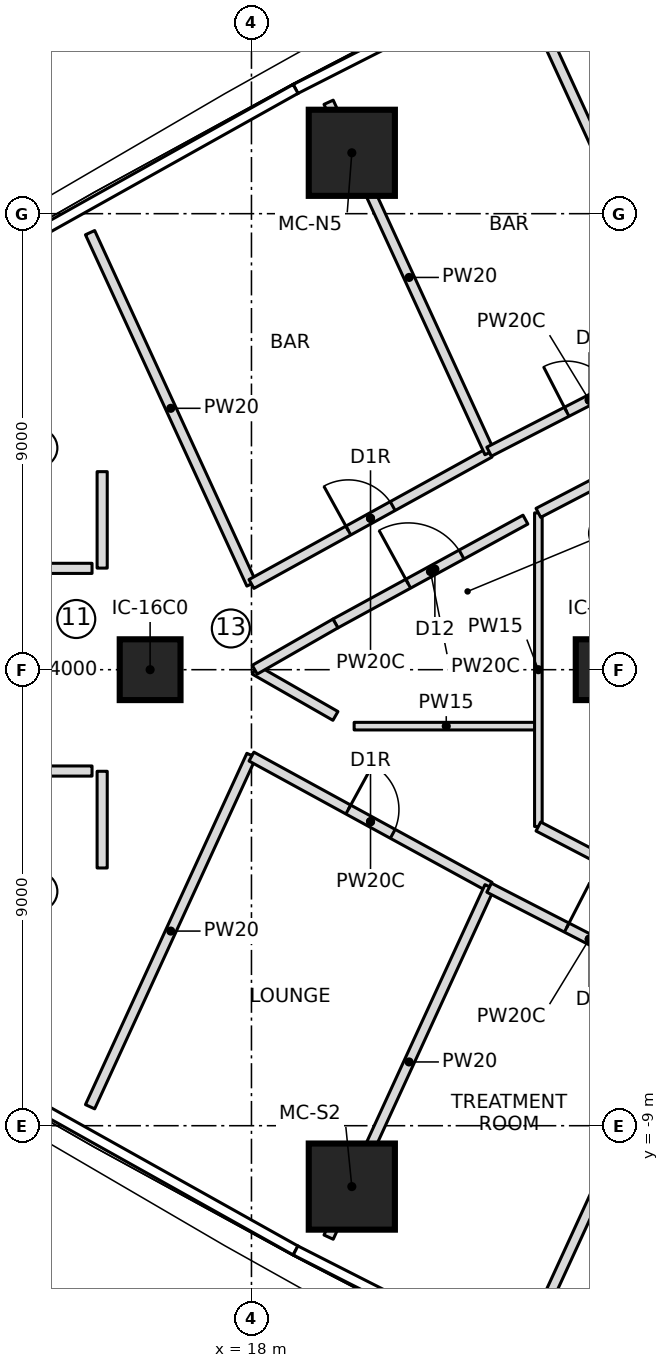
"""IFC4 building model, lengths in metres.
Left out: names, types, materials, properties, quantities, classifications, styles, units other than length and angle.
Written with IfcOpenShell. Run it as: python <this file> out.ifc"""

import sys

from ifc_helpers import new_model, si_unit, direction, frame, frame_2d, origin, origin_2d, place, context, subcontext, project, spatial, rectangle, extrude, element, fill, save


model = new_model("IFC4")
c1 = context("Model", 3, precision=1e-05, world=origin(), true_north=direction((0.0, 1.0)))
c2 = subcontext(c1, "Body", "Model", "MODEL_VIEW")
j1 = project(units=[si_unit("LENGTHUNIT", "METRE"), si_unit("PLANEANGLEUNIT", "RADIAN")], contexts=[c1])
p1 = place(None, origin())
s1 = spatial("IfcSite", under=j1, at=p1, CompositionType="ELEMENT")
p2 = place(p1, origin())
s2 = spatial("IfcBuilding", under=s1, at=p2, CompositionType="ELEMENT")
p3 = place(p2, frame((0.0, 0.0, 80.3)))
s3 = spatial("IfcBuildingStorey", under=s2, at=p3, CompositionType="ELEMENT", Elevation=80.3)
for number, where, z_axis, x_axis in (
    (1, (19.981, -10.202, 0.0), (0.0, 0.0, 1.0), (1.0, 0.0, 0.0)),
    (2, (19.981, 10.202, 0.0), (0.0, 0.0, 1.0), (1.0, 0.0, 0.0)),
):
    element("IfcColumn", number, at=place(p3, frame(where, z_axis=z_axis, x_axis=x_axis)), inside=s3, PredefinedType="COLUMN", context=c2, shape_type="SweptSolid", body=[
        extrude(rectangle(XDim=1.7, YDim=1.7, at=origin_2d()), origin(), (0.0, 0.0, 1.0), 4.6),
    ])
for number, where, z_axis, x_axis in (
    (3, (16.0, 0.0, 0.0), (0.0, 0.0, 1.0), (1.0, 0.0, 0.0)),
    (4, (25.0, 0.0, 0.0), (0.0, 0.0, 1.0), (1.0, 0.0, 0.0)),
):
    element("IfcColumn", number, at=place(p3, frame(where, z_axis=z_axis, x_axis=x_axis)), inside=s3, PredefinedType="COLUMN", context=c2, shape_type="SweptSolid", body=[
        extrude(rectangle(XDim=1.2, YDim=1.2, at=origin_2d()), origin(), (0.0, 0.0, 1.0), 4.6),
    ])
p4 = place(p3, frame((11.685, 2.0, 0.0), z_axis=(0.0, 0.0, 1.0), x_axis=(1.0, 0.0, 0.0)))
e5 = element("IfcWall", 5, at=p4, inside=s3, PredefinedType="PARTITIONING", context=c2, shape_type="SweptSolid", body=[
    extrude(rectangle(XDim=3.168, YDim=0.2, at=frame_2d((1.584, 0.0))), origin(), (0.0, 0.0, 1.0), 4.3),
])
p5 = place(p4, frame((1.084, 0.0, 0.0)))
e6 = element("IfcOpeningElement", 6, at=p5, cuts=e5, PredefinedType="OPENING", context=c2, shape_type="SweptSolid", body=[
    extrude(rectangle(XDim=1.0, YDim=2.1, at=frame_2d((0.5, 1.05))), frame((0.0, 0.11, 0.0), z_axis=(0.0, -1.0, 0.0), x_axis=(1.0, 0.0, 0.0)), (0.0, 0.0, 1.0), 0.22),
])
p6 = place(p3, frame((11.685, -2.0, 0.0), z_axis=(0.0, 0.0, 1.0), x_axis=(1.0, 0.0, 0.0)))
e7 = element("IfcWall", 7, at=p6, inside=s3, PredefinedType="PARTITIONING", context=c2, shape_type="SweptSolid", body=[
    extrude(rectangle(XDim=3.168, YDim=0.2, at=frame_2d((1.584, 0.0))), origin(), (0.0, 0.0, 1.0), 4.3),
])
p7 = place(p6, frame((1.084, 0.0, 0.0)))
e8 = element("IfcOpeningElement", 8, at=p7, cuts=e7, PredefinedType="OPENING", context=c2, shape_type="SweptSolid", body=[
    extrude(rectangle(XDim=1.0, YDim=2.1, at=frame_2d((0.5, 1.05))), frame((0.0, 0.11, 0.0), z_axis=(0.0, -1.0, 0.0), x_axis=(1.0, 0.0, 0.0)), (0.0, 0.0, 1.0), 0.22),
])
p8 = place(p3, frame((14.815, 8.626, 0.0), z_axis=(0.0, 0.0, 1.0), x_axis=(0.417432341259, -0.908708006166, 0.0)))
e9 = element("IfcWall", 9, at=p8, inside=s3, PredefinedType="PARTITIONING", context=c2, shape_type="SweptSolid", body=[
    extrude(rectangle(XDim=7.631, YDim=0.2, at=frame_2d((3.815, 0.0))), origin(), (0.0, 0.0, 1.0), 4.3),
])
p9 = place(p3, frame((18.0, 1.692, 0.0), z_axis=(0.0, 0.0, 1.0), x_axis=(0.875548487611, 0.483130257634, 0.0)))
e10 = element("IfcWall", 10, at=p9, inside=s3, PredefinedType="PARTITIONING", context=c2, shape_type="SweptSolid", body=[
    extrude(rectangle(XDim=5.367, YDim=0.2, at=frame_2d((2.683, 0.0))), origin(), (0.0, 0.0, 1.0), 4.3),
])
p10 = place(p9, frame((2.183, 0.0, 0.0)))
e11 = element("IfcOpeningElement", 11, at=p10, cuts=e10, PredefinedType="OPENING", context=c2, shape_type="SweptSolid", body=[
    extrude(rectangle(XDim=1.0, YDim=2.1, at=frame_2d((0.5, 1.05))), frame((0.0, 0.11, 0.0), z_axis=(0.0, -1.0, 0.0), x_axis=(1.0, 0.0, 0.0)), (0.0, 0.0, 1.0), 0.22),
])
p11 = place(p3, frame((22.699, 4.284, 0.0), z_axis=(0.0, 0.0, 1.0), x_axis=(-0.417413534969, 0.908716644959, 0.0)))
e12 = element("IfcWall", 12, at=p11, inside=s3, PredefinedType="PARTITIONING", context=c2, shape_type="SweptSolid", body=[
    extrude(rectangle(XDim=7.609, YDim=0.2, at=frame_2d((3.805, 0.0))), origin(), (0.0, 0.0, 1.0), 4.3),
])
p12 = place(p3, frame((22.69, 4.302, 0.0), z_axis=(0.0, 0.0, 1.0), x_axis=(0.889236075961, 0.457448577667, 0.0)))
e13 = element("IfcWall", 13, at=p12, inside=s3, PredefinedType="PARTITIONING", context=c2, shape_type="SweptSolid", body=[
    extrude(rectangle(XDim=4.443, YDim=0.2, at=frame_2d((2.222, 0.0))), origin(), (0.0, 0.0, 1.0), 4.3),
])
p13 = place(p12, frame((1.721, 0.0, 0.0)))
e14 = element("IfcOpeningElement", 14, at=p13, cuts=e13, PredefinedType="OPENING", context=c2, shape_type="SweptSolid", body=[
    extrude(rectangle(XDim=1.0, YDim=2.1, at=frame_2d((0.5, 1.05))), frame((0.0, 0.11, 0.0), z_axis=(0.0, -1.0, 0.0), x_axis=(1.0, 0.0, 0.0)), (0.0, 0.0, 1.0), 0.22),
])
p14 = place(p3, frame((26.641, 6.335, 0.0), z_axis=(0.0, 0.0, 1.0), x_axis=(-0.417455028008, 0.908697584233, 0.0)))
e15 = element("IfcWall", 15, at=p14, inside=s3, PredefinedType="PARTITIONING", context=c2, shape_type="SweptSolid", body=[
    extrude(rectangle(XDim=7.603, YDim=0.2, at=frame_2d((3.802, 0.0))), origin(), (0.0, 0.0, 1.0), 4.3),
])
p15 = place(p3, frame((14.815, -8.626, 0.0), z_axis=(0.0, 0.0, 1.0), x_axis=(0.417432341259, 0.908708006166, 0.0)))
e16 = element("IfcWall", 16, at=p15, inside=s3, PredefinedType="PARTITIONING", context=c2, shape_type="SweptSolid", body=[
    extrude(rectangle(XDim=7.631, YDim=0.2, at=frame_2d((3.815, 0.0))), origin(), (0.0, 0.0, 1.0), 4.3),
])
p16 = place(p3, frame((18.0, -1.715, 0.0), z_axis=(0.0, 0.0, 1.0), x_axis=(0.877354946945, -0.479841950096, 0.0)))
e17 = element("IfcWall", 17, at=p16, inside=s3, PredefinedType="PARTITIONING", context=c2, shape_type="SweptSolid", body=[
    extrude(rectangle(XDim=5.355, YDim=0.2, at=frame_2d((2.678, 0.0))), origin(), (0.0, 0.0, 1.0), 4.3),
])
p17 = place(p16, frame((2.178, 0.0, 0.0)))
e18 = element("IfcOpeningElement", 18, at=p17, cuts=e17, PredefinedType="OPENING", context=c2, shape_type="SweptSolid", body=[
    extrude(rectangle(XDim=1.0, YDim=2.1, at=frame_2d((0.5, 1.05))), frame((0.0, 0.11, 0.0), z_axis=(0.0, -1.0, 0.0), x_axis=(1.0, 0.0, 0.0)), (0.0, 0.0, 1.0), 0.22),
])
p18 = place(p3, frame((19.522, -11.199, 0.0), z_axis=(0.0, 0.0, 1.0), x_axis=(0.417413534969, 0.908716644959, 0.0)))
e19 = element("IfcWall", 19, at=p18, inside=s3, PredefinedType="PARTITIONING", context=c2, shape_type="SweptSolid", body=[
    extrude(rectangle(XDim=7.609, YDim=0.2, at=frame_2d((3.805, 0.0))), origin(), (0.0, 0.0, 1.0), 4.3),
])
p19 = place(p3, frame((22.69, -4.302, 0.0), z_axis=(0.0, 0.0, 1.0), x_axis=(0.889236075961, -0.457448577667, 0.0)))
e20 = element("IfcWall", 20, at=p19, inside=s3, PredefinedType="PARTITIONING", context=c2, shape_type="SweptSolid", body=[
    extrude(rectangle(XDim=4.443, YDim=0.2, at=frame_2d((2.222, 0.0))), origin(), (0.0, 0.0, 1.0), 4.3),
])
p20 = place(p19, frame((1.721, 0.0, 0.0)))
e21 = element("IfcOpeningElement", 21, at=p20, cuts=e20, PredefinedType="OPENING", context=c2, shape_type="SweptSolid", body=[
    extrude(rectangle(XDim=1.0, YDim=2.1, at=frame_2d((0.5, 1.05))), frame((0.0, 0.11, 0.0), z_axis=(0.0, -1.0, 0.0), x_axis=(1.0, 0.0, 0.0)), (0.0, 0.0, 1.0), 0.22),
])
p21 = place(p3, frame((23.467, -13.244, 0.0), z_axis=(0.0, 0.0, 1.0), x_axis=(0.417455028008, 0.908697584233, 0.0)))
e22 = element("IfcWall", 22, at=p21, inside=s3, PredefinedType="PARTITIONING", context=c2, shape_type="SweptSolid", body=[
    extrude(rectangle(XDim=7.603, YDim=0.2, at=frame_2d((3.802, 0.0))), origin(), (0.0, 0.0, 1.0), 4.3),
])
p22 = place(p3, frame((20.026, -1.114, 0.0), z_axis=(0.0, 0.0, 1.0), x_axis=(1.0, 0.0, 0.0)))
e23 = element("IfcWall", 23, at=p22, inside=s3, PredefinedType="PARTITIONING", context=c2, shape_type="SweptSolid", body=[
    extrude(rectangle(XDim=3.636, YDim=0.15, at=frame_2d((1.818, 0.0))), origin(), (0.0, 0.0, 1.0), 4.3),
])
p23 = place(p3, frame((19.657, 0.912, 0.0), z_axis=(0.0, 0.0, 1.0), x_axis=(0.877465075585, 0.479640533242, 0.0)))
e24 = element("IfcWall", 24, at=p23, inside=s3, PredefinedType="PARTITIONING", context=c2, shape_type="SweptSolid", body=[
    extrude(rectangle(XDim=4.273, YDim=0.2, at=frame_2d((2.137, 0.0))), origin(), (0.0, 0.0, 1.0), 4.3),
])
p24 = place(p23, frame((1.636, 0.0, 0.0)))
e25 = element("IfcOpeningElement", 25, at=p24, cuts=e24, PredefinedType="OPENING", context=c2, shape_type="SweptSolid", body=[
    extrude(rectangle(XDim=1.2, YDim=2.1, at=frame_2d((0.6, 1.05))), frame((0.0, 0.11, 0.0), z_axis=(0.0, -1.0, 0.0), x_axis=(1.0, 0.0, 0.0)), (0.0, 0.0, 1.0), 0.22),
])
for number, where, z_axis, x_axis in (
    (26, (19.657, -0.912, 0.0), (0.0, 0.0, 1.0), (-0.868, 0.497, 0.0)),
    (27, (18.065, 0.0, 0.0), (0.0, 0.0, 1.0), (0.868, 0.497, 0.0)),
):
    element("IfcWall", number, at=place(p3, frame(where, z_axis=z_axis, x_axis=x_axis)), inside=s3, PredefinedType="PARTITIONING", context=c2, shape_type="SweptSolid", body=[
        extrude(rectangle(XDim=1.835, YDim=0.2, at=frame_2d((0.918, 0.0))), origin(), (0.0, 0.0, 1.0), 4.3),
    ])
p25 = place(p3, frame((23.662, -3.095, 0.0), z_axis=(0.0, 0.0, 1.0), x_axis=(0.0, 1.0, 0.0)))
e28 = element("IfcWall", 28, at=p25, inside=s3, PredefinedType="PARTITIONING", context=c2, shape_type="SweptSolid", body=[
    extrude(rectangle(XDim=6.19, YDim=0.15, at=frame_2d((3.095, 0.0))), origin(), (0.0, 0.0, 1.0), 4.3),
])
for number, where, z_axis, x_axis in (
    (29, (27.196, -4.936, 0.0), (0.0, 0.0, 1.0), (-0.887, 0.462, 0.0)),
    (30, (23.662, 3.095, 0.0), (0.0, 0.0, 1.0), (0.887, 0.462, 0.0)),
):
    element("IfcWall", number, at=place(p3, frame(where, z_axis=z_axis, x_axis=x_axis)), inside=s3, PredefinedType="PARTITIONING", context=c2, shape_type="SweptSolid", body=[
        extrude(rectangle(XDim=3.985, YDim=0.2, at=frame_2d((1.992, 0.0))), origin(), (0.0, 0.0, 1.0), 4.3),
    ])
p26 = place(p3, frame((15.054, 3.909, 0.0), z_axis=(0.0, 0.0, 1.0), x_axis=(0.0, -1.0, 0.0)))
e31 = element("IfcWall", 31, at=p26, inside=s3, PredefinedType="PARTITIONING", context=c2, shape_type="SweptSolid", body=[
    extrude(rectangle(XDim=1.904, YDim=0.2, at=frame_2d((0.952, 0.0))), origin(), (0.0, 0.0, 1.0), 4.3),
])
p27 = place(p3, frame((15.054, -2.005, 0.0), z_axis=(0.0, 0.0, 1.0), x_axis=(0.0, -1.0, 0.0)))
e32 = element("IfcWall", 32, at=p27, inside=s3, PredefinedType="PARTITIONING", context=c2, shape_type="SweptSolid", body=[
    extrude(rectangle(XDim=1.908, YDim=0.2, at=frame_2d((0.954, 0.0))), origin(), (0.0, 0.0, 1.0), 4.3),
])
p28 = place(p10, origin())
e33 = element("IfcDoor", 33, at=p28, inside=s3, OperationType="SINGLE_SWING_RIGHT", PredefinedType="DOOR", context=c2, shape_type="SweptSolid", body=[
    extrude(rectangle(XDim=1.0, YDim=2.1, at=frame_2d((0.5, 1.05))), frame((0.0, 0.025, 0.0), z_axis=(0.0, -1.0, 0.0), x_axis=(1.0, 0.0, 0.0)), (0.0, 0.0, 1.0), 0.05),
])
fill(e11, e33)
p29 = place(p13, origin())
e34 = element("IfcDoor", 34, at=p29, inside=s3, OperationType="SINGLE_SWING_LEFT", PredefinedType="DOOR", context=c2, shape_type="SweptSolid", body=[
    extrude(rectangle(XDim=1.0, YDim=2.1, at=frame_2d((0.5, 1.05))), frame((0.0, 0.025, 0.0), z_axis=(0.0, -1.0, 0.0), x_axis=(1.0, 0.0, 0.0)), (0.0, 0.0, 1.0), 0.05),
])
fill(e14, e34)
p30 = place(p17, origin())
e35 = element("IfcDoor", 35, at=p30, inside=s3, OperationType="SINGLE_SWING_RIGHT", PredefinedType="DOOR", context=c2, shape_type="SweptSolid", body=[
    extrude(rectangle(XDim=1.0, YDim=2.1, at=frame_2d((0.5, 1.05))), frame((0.0, 0.025, 0.0), z_axis=(0.0, -1.0, 0.0), x_axis=(1.0, 0.0, 0.0)), (0.0, 0.0, 1.0), 0.05),
])
fill(e18, e35)
p31 = place(p20, origin())
e36 = element("IfcDoor", 36, at=p31, inside=s3, OperationType="SINGLE_SWING_LEFT", PredefinedType="DOOR", context=c2, shape_type="SweptSolid", body=[
    extrude(rectangle(XDim=1.0, YDim=2.1, at=frame_2d((0.5, 1.05))), frame((0.0, 0.025, 0.0), z_axis=(0.0, -1.0, 0.0), x_axis=(1.0, 0.0, 0.0)), (0.0, 0.0, 1.0), 0.05),
])
fill(e21, e36)
p32 = place(p24, origin())
e37 = element("IfcDoor", 37, at=p32, inside=s3, OperationType="SINGLE_SWING_RIGHT", PredefinedType="DOOR", context=c2, shape_type="SweptSolid", body=[
    extrude(rectangle(XDim=1.2, YDim=2.1, at=frame_2d((0.6, 1.05))), frame((0.0, 0.025, 0.0), z_axis=(0.0, -1.0, 0.0), x_axis=(1.0, 0.0, 0.0)), (0.0, 0.0, 1.0), 0.05),
])
fill(e25, e37)
save(model, sys.argv[1])
